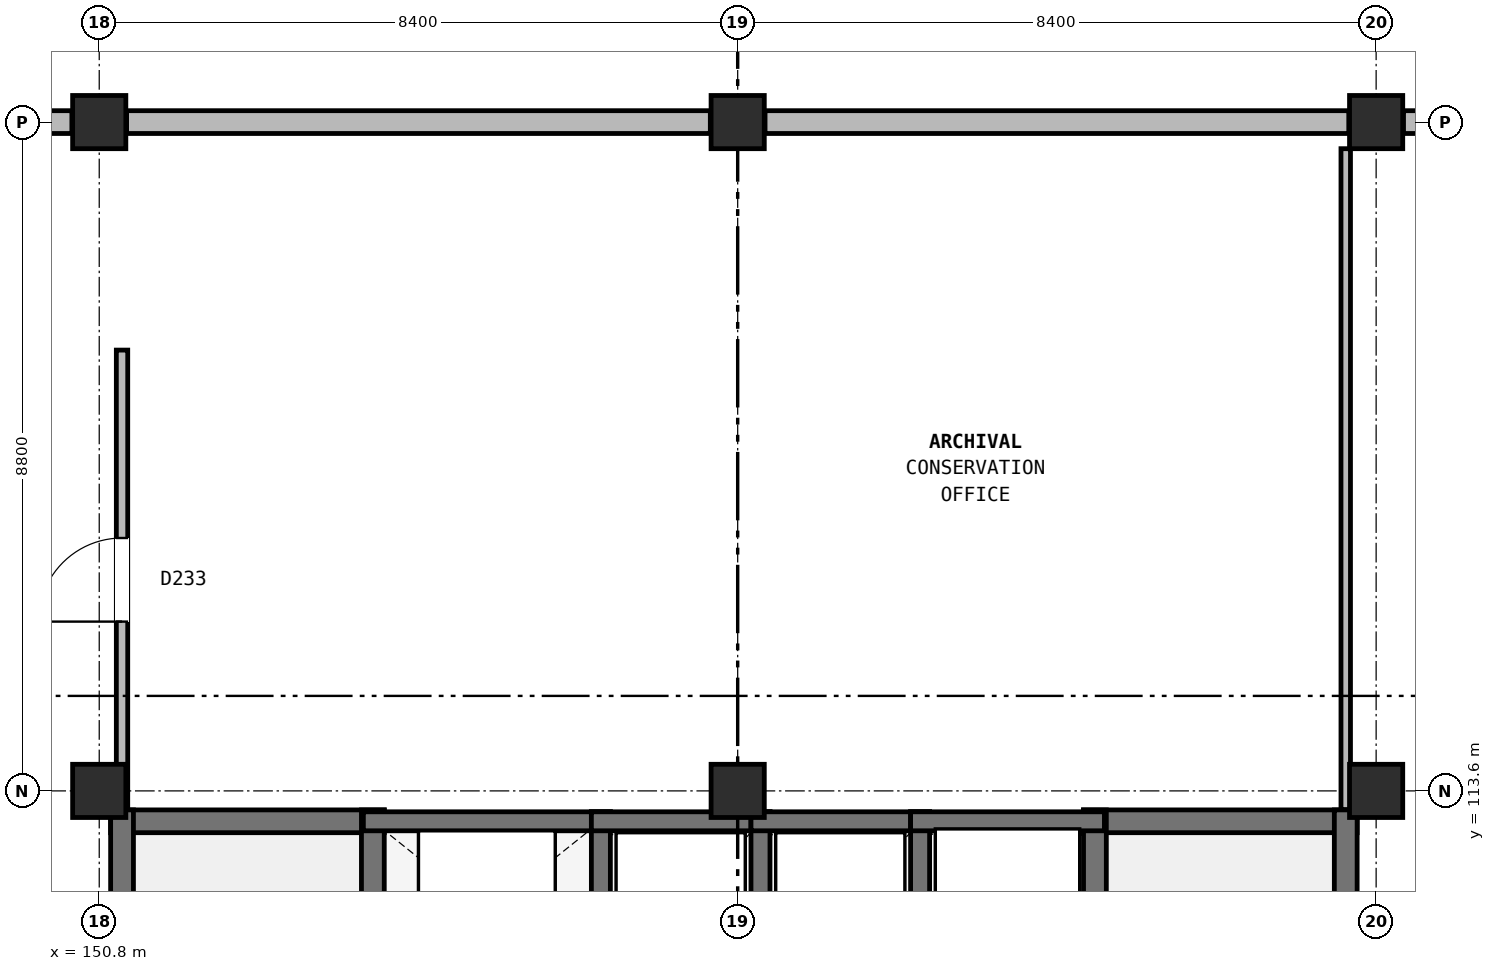
"""IFC4 building model, lengths in metres.
Left out: names, types, materials, properties, quantities, classifications, styles, units other than length and angle.
Written with IfcOpenShell. Run it as: python <this file> out.ifc"""

import sys

from ifc_helpers import new_model, si_unit, direction, frame, frame_2d, origin, origin_2d, place, context, subcontext, project, spatial, rectangle, extrude, element, fill, save


model = new_model("IFC4")
c1 = context("Model", 3, precision=1e-05, world=origin(), true_north=direction((0.0, 1.0)))
c2 = subcontext(c1, "Body", "Model", "MODEL_VIEW")
j1 = project(units=[si_unit("LENGTHUNIT", "METRE"), si_unit("PLANEANGLEUNIT", "RADIAN")], contexts=[c1])
p1 = place(None, origin())
s1 = spatial("IfcSite", under=j1, at=p1, CompositionType="ELEMENT")
p2 = place(p1, origin())
s2 = spatial("IfcBuilding", under=s1, at=p2, CompositionType="ELEMENT")
p3 = place(p2, frame((0.0, 0.0, 32.8)))
s3 = spatial("IfcBuildingStorey", under=s2, at=p3, CompositionType="ELEMENT", Elevation=32.8)
for number, where, z_axis, x_axis in (
    (1, (150.8, 113.6, 0.0), (0.0, 0.0, 1.0), (1.0, 0.0, 0.0)),
    (2, (150.8, 122.4, 0.0), (0.0, 0.0, 1.0), (1.0, 0.0, 0.0)),
    (3, (159.2, 113.6, 0.0), (0.0, 0.0, 1.0), (1.0, 0.0, 0.0)),
    (4, (159.2, 122.4, 0.0), (0.0, 0.0, 1.0), (1.0, 0.0, 0.0)),
    (5, (167.6, 113.6, 0.0), (0.0, 0.0, 1.0), (1.0, 0.0, 0.0)),
    (6, (167.6, 122.4, 0.0), (0.0, 0.0, 1.0), (1.0, 0.0, 0.0)),
):
    element("IfcColumn", number, at=place(p3, frame(where, z_axis=z_axis, x_axis=x_axis)), inside=s3, PredefinedType="COLUMN", context=c2, shape_type="SweptSolid", body=[
        extrude(rectangle(XDim=0.7, YDim=0.7, at=origin_2d()), origin(), (0.0, 0.0, 1.0), 4.0),
    ])
p4 = place(p3, frame((175.64, 122.4, 0.0), z_axis=(0.0, 0.0, 1.0), x_axis=(-1.0, 0.0, 0.0)))
e7 = element("IfcWall", 7, at=p4, inside=s3, PredefinedType="SOLIDWALL", context=c2, shape_type="SweptSolid", body=[
    extrude(rectangle(XDim=7.68, YDim=0.3, at=frame_2d((3.84, 0.0))), origin(), (0.0, 0.0, 1.0), 3.25),
])
p5 = place(p4, frame((0.72, 0.0, 0.9)))
e8 = element("IfcOpeningElement", 8, at=p5, cuts=e7, PredefinedType="OPENING", context=c2, shape_type="SweptSolid", body=[
    extrude(rectangle(XDim=2.6, YDim=2.0, at=frame_2d((1.3, 1.0))), frame((0.0, 0.16, 0.0), z_axis=(0.0, -1.0, 0.0), x_axis=(1.0, 0.0, 0.0)), (0.0, 0.0, 1.0), 0.32),
])
p6 = place(p3, frame((167.24, 122.4, 0.0), z_axis=(0.0, 0.0, 1.0), x_axis=(-1.0, 0.0, 0.0)))
e9 = element("IfcWall", 9, at=p6, inside=s3, PredefinedType="SOLIDWALL", context=c2, shape_type="SweptSolid", body=[
    extrude(rectangle(XDim=7.68, YDim=0.3, at=frame_2d((3.84, 0.0))), origin(), (0.0, 0.0, 1.0), 3.25),
])
p7 = place(p3, frame((158.84, 122.4, 0.0), z_axis=(0.0, 0.0, 1.0), x_axis=(-1.0, 0.0, 0.0)))
e10 = element("IfcWall", 10, at=p7, inside=s3, PredefinedType="SOLIDWALL", context=c2, shape_type="SweptSolid", body=[
    extrude(rectangle(XDim=7.68, YDim=0.3, at=frame_2d((3.84, 0.0))), origin(), (0.0, 0.0, 1.0), 3.25),
])
p8 = place(p3, frame((150.44, 122.4, 0.0), z_axis=(0.0, 0.0, 1.0), x_axis=(-1.0, 0.0, 0.0)))
e11 = element("IfcWall", 11, at=p8, inside=s3, PredefinedType="SOLIDWALL", context=c2, shape_type="SweptSolid", body=[
    extrude(rectangle(XDim=7.68, YDim=0.3, at=frame_2d((3.84, 0.0))), origin(), (0.0, 0.0, 1.0), 3.25),
])
p9 = place(p3, frame((150.95, 113.2, 0.0), z_axis=(0.0, 0.0, 1.0), x_axis=(1.0, 0.0, 0.0)))
e12 = element("IfcWall", 12, at=p9, inside=s3, PredefinedType="SHEAR", context=c2, shape_type="SweptSolid", body=[
    extrude(rectangle(XDim=3.6, YDim=0.3, at=frame_2d((1.8, 0.0))), origin(), (0.0, 0.0, 1.0), 4.0),
])
p10 = place(p3, frame((151.1, 105.05, 0.0), z_axis=(0.0, 0.0, 1.0), x_axis=(0.0, 1.0, 0.0)))
e13 = element("IfcWall", 13, at=p10, inside=s3, PredefinedType="SHEAR", context=c2, shape_type="SweptSolid", body=[
    extrude(rectangle(XDim=8.3, YDim=0.3, at=frame_2d((4.15, 0.0))), origin(), (0.0, 0.0, 1.0), 4.0),
])
p11 = place(p3, frame((154.4, 105.05, 0.0), z_axis=(0.0, 0.0, 1.0), x_axis=(0.0, 1.0, 0.0)))
e14 = element("IfcWall", 14, at=p11, inside=s3, PredefinedType="SHEAR", context=c2, shape_type="SweptSolid", body=[
    extrude(rectangle(XDim=8.3, YDim=0.3, at=frame_2d((4.15, 0.0))), origin(), (0.0, 0.0, 1.0), 4.0),
])
p12 = place(p11, frame((0.45, 0.0, 0.0)))
e15 = element("IfcOpeningElement", 15, at=p12, cuts=e14, PredefinedType="OPENING", context=c2, shape_type="SweptSolid", body=[
    extrude(rectangle(XDim=1.1, YDim=2.2, at=frame_2d((0.55, 1.1))), frame((0.0, 0.16, 0.0), z_axis=(0.0, -1.0, 0.0), x_axis=(1.0, 0.0, 0.0)), (0.0, 0.0, 1.0), 0.32),
])
p13 = place(p3, frame((163.75, 113.2, 0.0), z_axis=(0.0, 0.0, 1.0), x_axis=(1.0, 0.0, 0.0)))
e16 = element("IfcWall", 16, at=p13, inside=s3, PredefinedType="SHEAR", context=c2, shape_type="SweptSolid", body=[
    extrude(rectangle(XDim=3.6, YDim=0.3, at=frame_2d((1.8, 0.0))), origin(), (0.0, 0.0, 1.0), 4.0),
])
for number, where, z_axis, x_axis in (
    (17, (163.9, 105.05, 0.0), (0.0, 0.0, 1.0), (0.0, 1.0, 0.0)),
    (18, (167.2, 105.05, 0.0), (0.0, 0.0, 1.0), (0.0, 1.0, 0.0)),
):
    element("IfcWall", number, at=place(p3, frame(where, z_axis=z_axis, x_axis=x_axis)), inside=s3, PredefinedType="SHEAR", context=c2, shape_type="SweptSolid", body=[
        extrude(rectangle(XDim=8.3, YDim=0.3, at=frame_2d((4.15, 0.0))), origin(), (0.0, 0.0, 1.0), 4.0),
    ])
p14 = place(p3, frame((154.275, 113.2, 0.0), z_axis=(0.0, 0.0, 1.0), x_axis=(1.0, 0.0, 0.0)))
e19 = element("IfcWall", 19, at=p14, inside=s3, PredefinedType="SOLIDWALL", context=c2, shape_type="SweptSolid", body=[
    extrude(rectangle(XDim=3.25, YDim=0.25, at=frame_2d((1.625, 0.0))), origin(), (0.0, 0.0, 1.0), 3.68),
])
p15 = place(p3, frame((157.4, 110.675, 0.0), z_axis=(0.0, 0.0, 1.0), x_axis=(0.0, 1.0, 0.0)))
e20 = element("IfcWall", 20, at=p15, inside=s3, PredefinedType="SOLIDWALL", context=c2, shape_type="SweptSolid", body=[
    extrude(rectangle(XDim=2.65, YDim=0.25, at=frame_2d((1.325, 0.0))), origin(), (0.0, 0.0, 1.0), 3.68),
])
p16 = place(p3, frame((157.275, 113.2, 0.0), z_axis=(0.0, 0.0, 1.0), x_axis=(1.0, 0.0, 0.0)))
e21 = element("IfcWall", 21, at=p16, inside=s3, PredefinedType="SOLIDWALL", context=c2, shape_type="SweptSolid", body=[
    extrude(rectangle(XDim=2.35, YDim=0.25, at=frame_2d((1.175, 0.0))), origin(), (0.0, 0.0, 1.0), 3.68),
])
p17 = place(p3, frame((159.5, 110.675, 0.0), z_axis=(0.0, 0.0, 1.0), x_axis=(0.0, 1.0, 0.0)))
e22 = element("IfcWall", 22, at=p17, inside=s3, PredefinedType="SOLIDWALL", context=c2, shape_type="SweptSolid", body=[
    extrude(rectangle(XDim=2.65, YDim=0.25, at=frame_2d((1.325, 0.0))), origin(), (0.0, 0.0, 1.0), 3.68),
])
p18 = place(p3, frame((159.375, 113.2, 0.0), z_axis=(0.0, 0.0, 1.0), x_axis=(1.0, 0.0, 0.0)))
e23 = element("IfcWall", 23, at=p18, inside=s3, PredefinedType="SOLIDWALL", context=c2, shape_type="SweptSolid", body=[
    extrude(rectangle(XDim=2.35, YDim=0.25, at=frame_2d((1.175, 0.0))), origin(), (0.0, 0.0, 1.0), 3.68),
])
p19 = place(p3, frame((161.6, 110.675, 0.0), z_axis=(0.0, 0.0, 1.0), x_axis=(0.0, 1.0, 0.0)))
e24 = element("IfcWall", 24, at=p19, inside=s3, PredefinedType="SOLIDWALL", context=c2, shape_type="SweptSolid", body=[
    extrude(rectangle(XDim=2.65, YDim=0.25, at=frame_2d((1.325, 0.0))), origin(), (0.0, 0.0, 1.0), 3.68),
])
p20 = place(p3, frame((161.475, 113.2, 0.0), z_axis=(0.0, 0.0, 1.0), x_axis=(1.0, 0.0, 0.0)))
e25 = element("IfcWall", 25, at=p20, inside=s3, PredefinedType="SOLIDWALL", context=c2, shape_type="SweptSolid", body=[
    extrude(rectangle(XDim=2.55, YDim=0.25, at=frame_2d((1.275, 0.0))), origin(), (0.0, 0.0, 1.0), 3.68),
])
p21 = place(p3, frame((151.1, 113.355, 0.0), z_axis=(0.0, 0.0, 1.0), x_axis=(0.0, 1.0, 0.0)))
e26 = element("IfcWall", 26, at=p21, inside=s3, PredefinedType="PARTITIONING", context=c2, shape_type="SweptSolid", body=[
    extrude(rectangle(XDim=6.045, YDim=0.15, at=frame_2d((3.022, 0.0))), origin(), (0.0, 0.0, 1.0), 3.245),
])
p22 = place(p21, frame((2.472, 0.0, 0.0)))
e27 = element("IfcOpeningElement", 27, at=p22, cuts=e26, PredefinedType="OPENING", context=c2, shape_type="SweptSolid", body=[
    extrude(rectangle(XDim=1.1, YDim=2.15, at=frame_2d((0.55, 1.075))), frame((0.0, 0.085, 0.0), z_axis=(0.0, -1.0, 0.0), x_axis=(1.0, 0.0, 0.0)), (0.0, 0.0, 1.0), 0.17),
])
p23 = place(p3, frame((167.2, 113.355, 0.0), z_axis=(0.0, 0.0, 1.0), x_axis=(0.0, 1.0, 0.0)))
e28 = element("IfcWall", 28, at=p23, inside=s3, PredefinedType="PARTITIONING", context=c2, shape_type="SweptSolid", body=[
    extrude(rectangle(XDim=8.695, YDim=0.125, at=frame_2d((4.348, 0.0))), origin(), (0.0, 0.0, 1.0), 3.245),
])
p24 = place(p22, origin())
e29 = element("IfcDoor", 29, at=p24, inside=s3, OperationType="SINGLE_SWING_LEFT", PredefinedType="DOOR", context=c2, shape_type="SweptSolid", body=[
    extrude(rectangle(XDim=1.1, YDim=2.15, at=frame_2d((0.55, 1.075))), frame((0.0, 0.025, 0.0), z_axis=(0.0, -1.0, 0.0), x_axis=(1.0, 0.0, 0.0)), (0.0, 0.0, 1.0), 0.05),
])
fill(e27, e29)
save(model, sys.argv[1])
